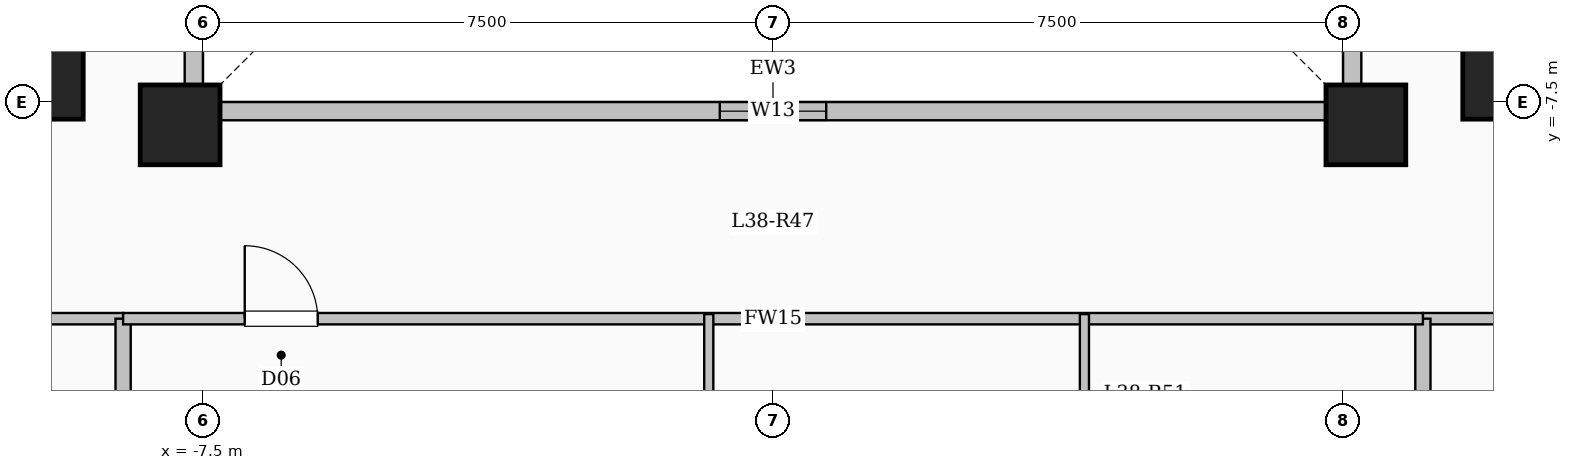
"""IFC4 building model, lengths in metres.
Left out: names, types, materials, properties, quantities, classifications, styles, units other than length and angle.
Written with IfcOpenShell. Run it as: python <this file> out.ifc"""

import sys

from ifc_helpers import new_model, si_unit, direction, frame, frame_2d, origin, origin_2d, place, context, subcontext, project, spatial, rectangle, extrude, element, fill, save


model = new_model("IFC4")
c1 = context("Model", 3, precision=1e-05, world=origin(), true_north=direction((0.0, 1.0)))
c2 = subcontext(c1, "Body", "Model", "MODEL_VIEW")
j1 = project(units=[si_unit("LENGTHUNIT", "METRE"), si_unit("PLANEANGLEUNIT", "RADIAN")], contexts=[c1])
p1 = place(None, origin())
s1 = spatial("IfcSite", under=j1, at=p1, CompositionType="ELEMENT")
p2 = place(p1, origin())
s2 = spatial("IfcBuilding", under=s1, at=p2, CompositionType="ELEMENT")
p3 = place(p2, frame((0.0, 0.0, 142.65)))
s3 = spatial("IfcBuildingStorey", under=s2, at=p3, CompositionType="ELEMENT", Elevation=142.65)
for number, where, z_axis, x_axis in (
    (1, (-7.8, -7.8, 0.0), (0.0, 0.0, 1.0), (1.0, 0.0, 0.0)),
    (2, (7.8, -7.8, 0.0), (0.0, 0.0, 1.0), (1.0, 0.0, 0.0)),
    (3, (-9.6, -7.2, 0.0), (0.0, 0.0, 1.0), (1.0, 0.0, 0.0)),
    (4, (9.6, -7.2, 0.0), (0.0, 0.0, 1.0), (1.0, 0.0, 0.0)),
):
    element("IfcColumn", number, at=place(p3, frame(where, z_axis=z_axis, x_axis=x_axis)), inside=s3, PredefinedType="COLUMN", context=c2, shape_type="SweptSolid", body=[
        extrude(rectangle(XDim=1.05, YDim=1.05, at=origin_2d()), origin(), (0.0, 0.0, 1.0), 3.35),
    ])
p4 = place(p3, frame((-7.62, -7.62, 0.0), z_axis=(0.0, 0.0, 1.0), x_axis=(1.0, 0.0, 0.0)))
e5 = element("IfcWall", 5, at=p4, inside=s3, PredefinedType="SOLIDWALL", context=c2, shape_type="SweptSolid", body=[
    extrude(rectangle(XDim=15.24, YDim=0.24, at=frame_2d((7.62, 0.0))), origin(), (0.0, 0.0, 1.0), 3.1),
])
p5 = place(p4, frame((6.92, 0.0, 0.95)))
e6 = element("IfcOpeningElement", 6, at=p5, cuts=e5, PredefinedType="OPENING", context=c2, shape_type="SweptSolid", body=[
    extrude(rectangle(XDim=1.4, YDim=1.5, at=frame_2d((0.7, 0.75))), frame((0.0, 0.13, 0.0), z_axis=(0.0, -1.0, 0.0), x_axis=(1.0, 0.0, 0.0)), (0.0, 0.0, 1.0), 0.26),
])
p6 = place(p3, frame((7.62, -7.62, 0.0), z_axis=(0.0, 0.0, 1.0), x_axis=(0.0, 1.0, 0.0)))
e7 = element("IfcWall", 7, at=p6, inside=s3, PredefinedType="SOLIDWALL", context=c2, shape_type="SweptSolid", body=[
    extrude(rectangle(XDim=15.24, YDim=0.24, at=frame_2d((7.62, 0.0))), origin(), (0.0, 0.0, 1.0), 3.1),
])
p7 = place(p6, frame((6.92, 0.0, 0.95)))
e8 = element("IfcOpeningElement", 8, at=p7, cuts=e7, PredefinedType="OPENING", context=c2, shape_type="SweptSolid", body=[
    extrude(rectangle(XDim=1.4, YDim=1.5, at=frame_2d((0.7, 0.75))), frame((0.0, 0.13, 0.0), z_axis=(0.0, -1.0, 0.0), x_axis=(1.0, 0.0, 0.0)), (0.0, 0.0, 1.0), 0.26),
])
p8 = place(p3, frame((-7.62, 7.62, 0.0), z_axis=(0.0, 0.0, 1.0), x_axis=(0.0, -1.0, 0.0)))
e9 = element("IfcWall", 9, at=p8, inside=s3, PredefinedType="SOLIDWALL", context=c2, shape_type="SweptSolid", body=[
    extrude(rectangle(XDim=15.24, YDim=0.24, at=frame_2d((7.62, 0.0))), origin(), (0.0, 0.0, 1.0), 3.1),
])
p9 = place(p8, frame((6.92, 0.0, 0.95)))
e10 = element("IfcOpeningElement", 10, at=p9, cuts=e9, PredefinedType="OPENING", context=c2, shape_type="SweptSolid", body=[
    extrude(rectangle(XDim=1.4, YDim=1.5, at=frame_2d((0.7, 0.75))), frame((0.0, 0.13, 0.0), z_axis=(0.0, -1.0, 0.0), x_axis=(1.0, 0.0, 0.0)), (0.0, 0.0, 1.0), 0.26),
])
p10 = place(p3, frame((-19.55, -10.35, 0.0), z_axis=(0.0, 0.0, 1.0), x_axis=(1.0, 0.0, 0.0)))
e11 = element("IfcWall", 11, at=p10, inside=s3, PredefinedType="PARTITIONING", context=c2, shape_type="SweptSolid", body=[
    extrude(rectangle(XDim=11.0, YDim=0.15, at=frame_2d((5.5, 0.0))), origin(), (0.0, 0.0, 1.0), 3.1),
])
p11 = place(p10, frame((1.466, 0.0, 0.0)))
e12 = element("IfcOpeningElement", 12, at=p11, cuts=e11, PredefinedType="OPENING", context=c2, shape_type="SweptSolid", body=[
    extrude(rectangle(XDim=0.95, YDim=2.15, at=frame_2d((0.475, 1.075))), frame((0.0, 0.085, 0.0), z_axis=(0.0, -1.0, 0.0), x_axis=(1.0, 0.0, 0.0)), (0.0, 0.0, 1.0), 0.17),
])
p12 = place(p10, frame((5.438, 0.0, 0.0)))
e13 = element("IfcOpeningElement", 13, at=p12, cuts=e11, PredefinedType="OPENING", context=c2, shape_type="SweptSolid", body=[
    extrude(rectangle(XDim=0.95, YDim=2.15, at=frame_2d((0.475, 1.075))), frame((0.0, 0.085, 0.0), z_axis=(0.0, -1.0, 0.0), x_axis=(1.0, 0.0, 0.0)), (0.0, 0.0, 1.0), 0.17),
])
p13 = place(p10, frame((8.972, 0.0, 0.0)))
e14 = element("IfcOpeningElement", 14, at=p13, cuts=e11, PredefinedType="OPENING", context=c2, shape_type="SweptSolid", body=[
    extrude(rectangle(XDim=0.95, YDim=2.15, at=frame_2d((0.475, 1.075))), frame((0.0, 0.085, 0.0), z_axis=(0.0, -1.0, 0.0), x_axis=(1.0, 0.0, 0.0)), (0.0, 0.0, 1.0), 0.17),
])
p14 = place(p3, frame((8.55, -10.35, 0.0), z_axis=(0.0, 0.0, 1.0), x_axis=(1.0, 0.0, 0.0)))
e15 = element("IfcWall", 15, at=p14, inside=s3, PredefinedType="PARTITIONING", context=c2, shape_type="SweptSolid", body=[
    extrude(rectangle(XDim=11.0, YDim=0.15, at=frame_2d((5.5, 0.0))), origin(), (0.0, 0.0, 1.0), 3.1),
])
p15 = place(p14, frame((1.516, 0.0, 0.0)))
e16 = element("IfcOpeningElement", 16, at=p15, cuts=e15, PredefinedType="OPENING", context=c2, shape_type="SweptSolid", body=[
    extrude(rectangle(XDim=0.95, YDim=2.15, at=frame_2d((0.475, 1.075))), frame((0.0, 0.085, 0.0), z_axis=(0.0, -1.0, 0.0), x_axis=(1.0, 0.0, 0.0)), (0.0, 0.0, 1.0), 0.17),
])
p16 = place(p14, frame((5.488, 0.0, 0.0)))
e17 = element("IfcOpeningElement", 17, at=p16, cuts=e15, PredefinedType="OPENING", context=c2, shape_type="SweptSolid", body=[
    extrude(rectangle(XDim=0.95, YDim=2.15, at=frame_2d((0.475, 1.075))), frame((0.0, 0.085, 0.0), z_axis=(0.0, -1.0, 0.0), x_axis=(1.0, 0.0, 0.0)), (0.0, 0.0, 1.0), 0.17),
])
p17 = place(p14, frame((9.022, 0.0, 0.0)))
e18 = element("IfcOpeningElement", 18, at=p17, cuts=e15, PredefinedType="OPENING", context=c2, shape_type="SweptSolid", body=[
    extrude(rectangle(XDim=0.95, YDim=2.15, at=frame_2d((0.475, 1.075))), frame((0.0, 0.085, 0.0), z_axis=(0.0, -1.0, 0.0), x_axis=(1.0, 0.0, 0.0)), (0.0, 0.0, 1.0), 0.17),
])
for number, where, z_axis, x_axis in (
    (19, (-8.55, -21.804, 0.0), (0.0, 0.0, 1.0), (0.0, 1.0, 0.0)),
    (20, (8.55, -21.804, 0.0), (0.0, 0.0, 1.0), (0.0, 1.0, 0.0)),
):
    element("IfcWall", number, at=place(p3, frame(where, z_axis=z_axis, x_axis=x_axis)), inside=s3, PredefinedType="SOLIDWALL", context=c2, shape_type="SweptSolid", body=[
        extrude(rectangle(XDim=11.454, YDim=0.2, at=frame_2d((5.727, 0.0))), origin(), (0.0, 0.0, 1.0), 3.1),
    ])
p18 = place(p3, frame((-8.55, -10.35, 0.0), z_axis=(0.0, 0.0, 1.0), x_axis=(1.0, 0.0, 0.0)))
e21 = element("IfcWall", 21, at=p18, inside=s3, PredefinedType="PARTITIONING", context=c2, shape_type="SweptSolid", body=[
    extrude(rectangle(XDim=17.1, YDim=0.15, at=frame_2d((8.55, 0.0))), origin(), (0.0, 0.0, 1.0), 3.1),
])
p19 = place(p18, frame((1.6, 0.0, 0.0)))
e22 = element("IfcOpeningElement", 22, at=p19, cuts=e21, PredefinedType="OPENING", context=c2, shape_type="SweptSolid", body=[
    extrude(rectangle(XDim=0.96, YDim=2.15, at=frame_2d((0.48, 1.075))), frame((0.0, 0.085, 0.0), z_axis=(0.0, -1.0, 0.0), x_axis=(1.0, 0.0, 0.0)), (0.0, 0.0, 1.0), 0.17),
])
p20 = place(p3, frame((-0.845, -22.68, 0.0), z_axis=(0.0, 0.0, 1.0), x_axis=(0.0, 1.0, 0.0)))
e23 = element("IfcWall", 23, at=p20, inside=s3, PredefinedType="PARTITIONING", context=c2, shape_type="SweptSolid", body=[
    extrude(rectangle(XDim=12.39, YDim=0.12, at=frame_2d((6.195, 0.0))), origin(), (0.0, 0.0, 1.0), 3.1),
])
p21 = place(p20, frame((8.395, 0.0, 0.0)))
e24 = element("IfcOpeningElement", 24, at=p21, cuts=e23, PredefinedType="OPENING", context=c2, shape_type="SweptSolid", body=[
    extrude(rectangle(XDim=1.08, YDim=2.15, at=frame_2d((0.54, 1.075))), frame((0.0, 0.07, 0.0), z_axis=(0.0, -1.0, 0.0), x_axis=(1.0, 0.0, 0.0)), (0.0, 0.0, 1.0), 0.14),
])
p22 = place(p3, frame((4.097, -12.92, 0.0), z_axis=(0.0, 0.0, 1.0), x_axis=(0.0, 1.0, 0.0)))
e25 = element("IfcWall", 25, at=p22, inside=s3, PredefinedType="PARTITIONING", context=c2, shape_type="SweptSolid", body=[
    extrude(rectangle(XDim=2.63, YDim=0.12, at=frame_2d((1.315, 0.0))), origin(), (0.0, 0.0, 1.0), 3.1),
])
p23 = place(p5, origin())
e26 = element("IfcWindow", 26, at=p23, inside=s3, PartitioningType="SINGLE_PANEL", PredefinedType="WINDOW", context=c2, shape_type="SweptSolid", body=[
    extrude(rectangle(XDim=1.4, YDim=1.5, at=frame_2d((0.7, 0.75))), frame((0.0, 0.03, 0.0), z_axis=(0.0, -1.0, 0.0), x_axis=(1.0, 0.0, 0.0)), (0.0, 0.0, 1.0), 0.06),
])
fill(e6, e26)
p24 = place(p19, origin())
e27 = element("IfcDoor", 27, at=p24, inside=s3, OperationType="SINGLE_SWING_LEFT", PredefinedType="DOOR", context=c2, shape_type="SweptSolid", body=[
    extrude(rectangle(XDim=0.96, YDim=2.15, at=frame_2d((0.48, 1.075))), frame((0.0, 0.025, 0.0), z_axis=(0.0, -1.0, 0.0), x_axis=(1.0, 0.0, 0.0)), (0.0, 0.0, 1.0), 0.05),
])
fill(e22, e27)
save(model, sys.argv[1])
